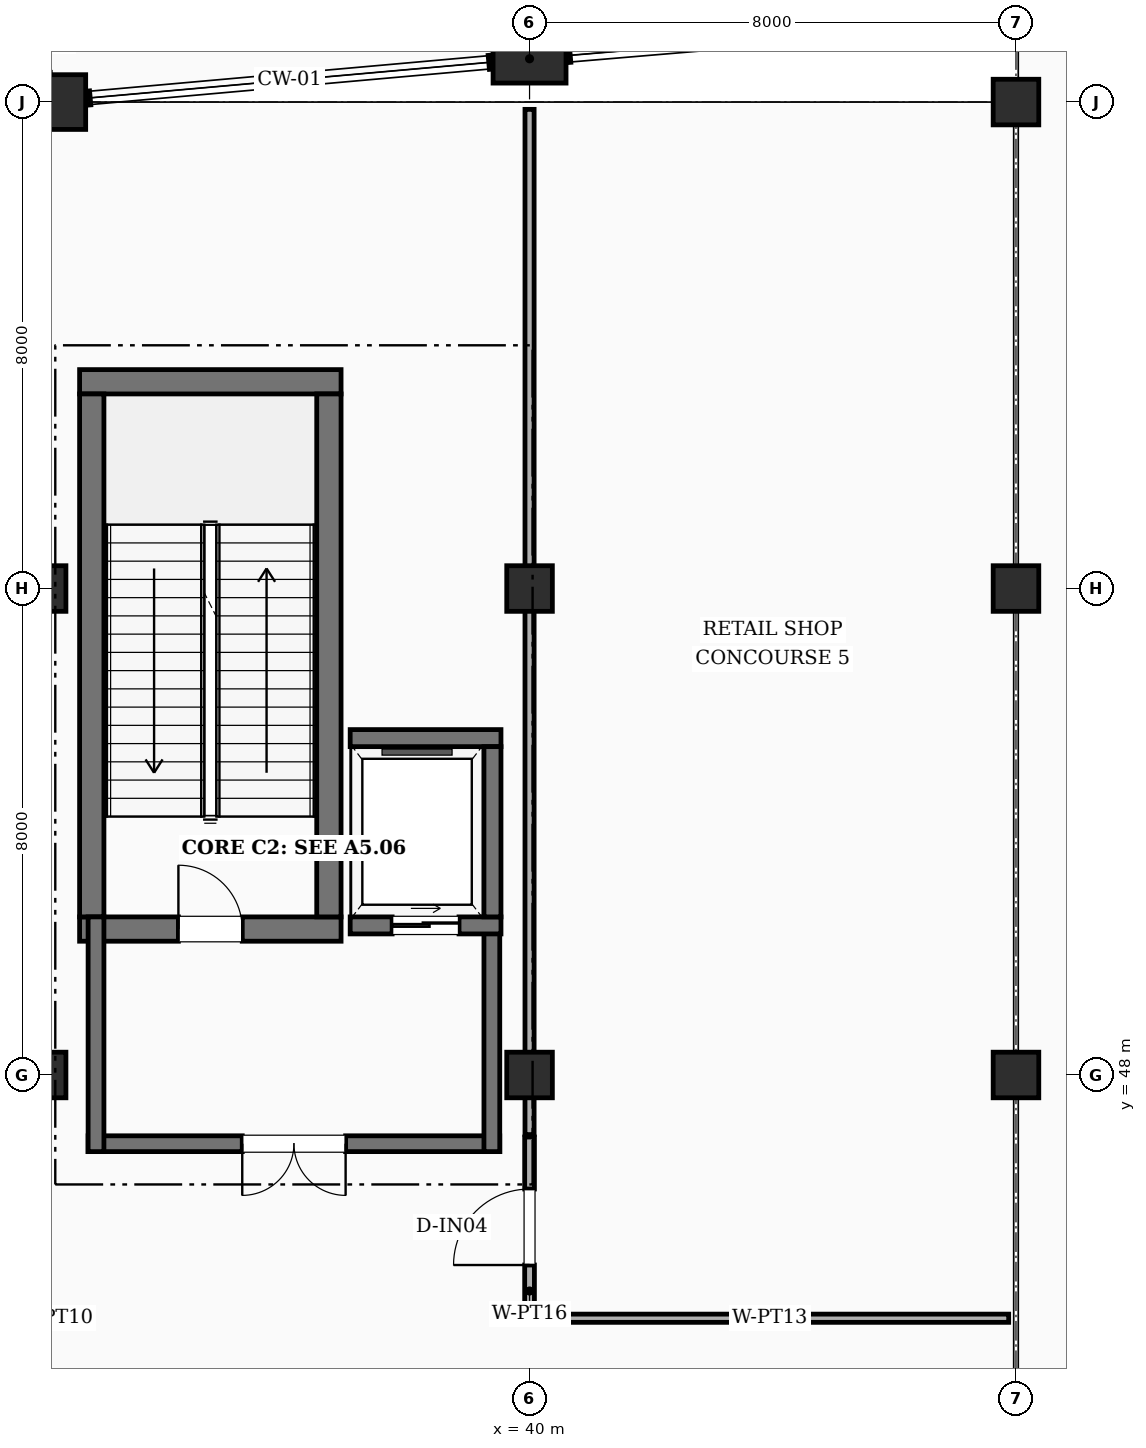
"""IFC4 building model, lengths in metres.
Left out: names, types, materials, properties, quantities, classifications, styles, units other than length and angle.
Written with IfcOpenShell. Run it as: python <this file> out.ifc"""

import sys

from ifc_helpers import new_model, si_unit, direction, frame, frame_2d, origin, origin_2d, place, context, subcontext, project, spatial, rectangle, extrude, element, fill, save


model = new_model("IFC4")
c1 = context("Model", 3, precision=1e-05, world=origin(), true_north=direction((0.0, 1.0)))
c2 = subcontext(c1, "Body", "Model", "MODEL_VIEW")
j1 = project(units=[si_unit("LENGTHUNIT", "METRE"), si_unit("PLANEANGLEUNIT", "RADIAN")], contexts=[c1])
p1 = place(None, origin())
s1 = spatial("IfcSite", under=j1, at=p1, CompositionType="ELEMENT")
p2 = place(p1, origin())
s2 = spatial("IfcBuilding", under=s1, at=p2, CompositionType="ELEMENT")
p3 = place(p2, origin())
s3 = spatial("IfcBuildingStorey", under=s2, at=p3, CompositionType="ELEMENT", Elevation=0.0)
p4 = place(p3, frame((32.0, 64.0, 0.0), z_axis=(0.0, 0.0, 1.0), x_axis=(1.0, 0.0, 0.0)))
e1 = element("IfcColumn", 1, at=p4, inside=s3, PredefinedType="COLUMN", context=c2, shape_type="SweptSolid", body=[
    extrude(rectangle(XDim=1.4, YDim=0.9, at=origin_2d()), origin(), (0.0, 0.0, 1.0), 5.4),
])
p5 = place(p3, frame((40.0, 64.712, 0.0), z_axis=(0.0, 0.0, 1.0), x_axis=(1.0, 0.0, 0.0)))
e2 = element("IfcColumn", 2, at=p5, inside=s3, PredefinedType="COLUMN", context=c2, shape_type="SweptSolid", body=[
    extrude(rectangle(XDim=1.2, YDim=0.8, at=origin_2d()), origin(), (0.0, 0.0, 1.0), 5.4),
])
for number, where, z_axis, x_axis in (
    (3, (32.0, 48.0, 0.0), (0.0, 0.0, 1.0), (1.0, 0.0, 0.0)),
    (4, (32.0, 56.0, 0.0), (0.0, 0.0, 1.0), (1.0, 0.0, 0.0)),
    (5, (40.0, 48.0, 0.0), (0.0, 0.0, 1.0), (1.0, 0.0, 0.0)),
    (6, (40.0, 56.0, 0.0), (0.0, 0.0, 1.0), (1.0, 0.0, 0.0)),
    (7, (48.0, 48.0, 0.0), (0.0, 0.0, 1.0), (1.0, 0.0, 0.0)),
    (8, (48.0, 56.0, 0.0), (0.0, 0.0, 1.0), (1.0, 0.0, 0.0)),
    (9, (48.0, 64.0, 0.0), (0.0, 0.0, 1.0), (1.0, 0.0, 0.0)),
):
    element("IfcColumn", number, at=place(p3, frame(where, z_axis=z_axis, x_axis=x_axis)), inside=s3, PredefinedType="COLUMN", context=c2, shape_type="SweptSolid", body=[
        extrude(rectangle(XDim=0.75, YDim=0.75, at=origin_2d()), origin(), (0.0, 0.0, 1.0), 5.4),
    ])
p6 = place(p3, frame((32.6, 50.4, 0.0), z_axis=(0.0, 0.0, 1.0), x_axis=(1.0, 0.0, 0.0)))
e10 = element("IfcWall", 10, at=p6, inside=s3, PredefinedType="SHEAR", context=c2, shape_type="SweptSolid", body=[
    extrude(rectangle(XDim=4.3, YDim=0.4, at=frame_2d((2.15, 0.0))), origin(), (0.0, 0.0, 1.0), 5.4),
])
p7 = place(p6, frame((1.625, 0.0, 0.0)))
e11 = element("IfcOpeningElement", 11, at=p7, cuts=e10, PredefinedType="OPENING", context=c2, shape_type="SweptSolid", body=[
    extrude(rectangle(XDim=1.05, YDim=2.15, at=frame_2d((0.525, 1.075))), frame((0.0, 0.21, 0.0), z_axis=(0.0, -1.0, 0.0), x_axis=(1.0, 0.0, 0.0)), (0.0, 0.0, 1.0), 0.42),
])
p8 = place(p3, frame((32.6, 59.4, 0.0), z_axis=(0.0, 0.0, 1.0), x_axis=(1.0, 0.0, 0.0)))
e12 = element("IfcWall", 12, at=p8, inside=s3, PredefinedType="SHEAR", context=c2, shape_type="SweptSolid", body=[
    extrude(rectangle(XDim=4.3, YDim=0.4, at=frame_2d((2.15, 0.0))), origin(), (0.0, 0.0, 1.0), 5.4),
])
for number, where, z_axis, x_axis in (
    (13, (32.8, 50.6, 0.0), (0.0, 0.0, 1.0), (0.0, 1.0, 0.0)),
    (14, (36.7, 50.6, 0.0), (0.0, 0.0, 1.0), (0.0, 1.0, 0.0)),
):
    element("IfcWall", number, at=place(p3, frame(where, z_axis=z_axis, x_axis=x_axis)), inside=s3, PredefinedType="SHEAR", context=c2, shape_type="SweptSolid", body=[
        extrude(rectangle(XDim=8.6, YDim=0.4, at=frame_2d((4.3, 0.0))), origin(), (0.0, 0.0, 1.0), 5.4),
    ])
p9 = place(p3, frame((39.51, 46.87, 0.0), z_axis=(0.0, 0.0, 1.0), x_axis=(-1.0, 0.0, 0.0)))
e15 = element("IfcWall", 15, at=p9, inside=s3, PredefinedType="SHEAR", context=c2, shape_type="SweptSolid", body=[
    extrude(rectangle(XDim=6.77, YDim=0.26, at=frame_2d((3.385, 0.0))), origin(), (0.0, 0.0, 1.0), 5.4),
])
p10 = place(p9, frame((2.535, 0.0, 0.0)))
e16 = element("IfcOpeningElement", 16, at=p10, cuts=e15, PredefinedType="OPENING", context=c2, shape_type="SweptSolid", body=[
    extrude(rectangle(XDim=1.7, YDim=2.2, at=frame_2d((0.85, 1.1))), frame((0.0, 0.14, 0.0), z_axis=(0.0, -1.0, 0.0), x_axis=(1.0, 0.0, 0.0)), (0.0, 0.0, 1.0), 0.28),
])
for number, where, z_axis, x_axis in (
    (17, (32.87, 46.74, 0.0), (0.0, 0.0, 1.0), (0.0, 1.0, 0.0)),
    (18, (39.38, 46.74, 0.0), (0.0, 0.0, 1.0), (0.0, 1.0, 0.0)),
):
    element("IfcWall", number, at=place(p3, frame(where, z_axis=z_axis, x_axis=x_axis)), inside=s3, PredefinedType="SHEAR", context=c2, shape_type="SweptSolid", body=[
        extrude(rectangle(XDim=3.86, YDim=0.26, at=frame_2d((1.93, 0.0))), origin(), (0.0, 0.0, 1.0), 5.4),
    ])
p11 = place(p3, frame((37.05, 50.46, 0.0), z_axis=(0.0, 0.0, 1.0), x_axis=(1.0, 0.0, 0.0)))
e19 = element("IfcWall", 19, at=p11, inside=s3, PredefinedType="SHEAR", context=c2, shape_type="SweptSolid", body=[
    extrude(rectangle(XDim=2.48, YDim=0.28, at=frame_2d((1.24, 0.0))), origin(), (0.0, 0.0, 1.0), 5.4),
])
p12 = place(p11, frame((0.69, 0.0, 0.0)))
e20 = element("IfcOpeningElement", 20, at=p12, cuts=e19, PredefinedType="OPENING", context=c2, shape_type="SweptSolid", body=[
    extrude(rectangle(XDim=1.1, YDim=2.15, at=frame_2d((0.55, 1.075))), frame((0.0, 0.15, 0.0), z_axis=(0.0, -1.0, 0.0), x_axis=(1.0, 0.0, 0.0)), (0.0, 0.0, 1.0), 0.3),
])
p13 = place(p3, frame((37.05, 53.54, 0.0), z_axis=(0.0, 0.0, 1.0), x_axis=(1.0, 0.0, 0.0)))
e21 = element("IfcWall", 21, at=p13, inside=s3, PredefinedType="SHEAR", context=c2, shape_type="SweptSolid", body=[
    extrude(rectangle(XDim=2.48, YDim=0.28, at=frame_2d((1.24, 0.0))), origin(), (0.0, 0.0, 1.0), 5.4),
])
p14 = place(p3, frame((39.39, 50.6, 0.0), z_axis=(0.0, 0.0, 1.0), x_axis=(0.0, 1.0, 0.0)))
e22 = element("IfcWall", 22, at=p14, inside=s3, PredefinedType="SHEAR", context=c2, shape_type="SweptSolid", body=[
    extrude(rectangle(XDim=2.8, YDim=0.28, at=frame_2d((1.4, 0.0))), origin(), (0.0, 0.0, 1.0), 5.4),
])
p15 = place(p3, frame((31.62, 44.0, 0.0), z_axis=(0.0, 0.0, 1.0), x_axis=(1.0, 0.0, 0.0)))
e23 = element("IfcWall", 23, at=p15, inside=s3, PredefinedType="PARTITIONING", context=c2, shape_type="SweptSolid", body=[
    extrude(rectangle(XDim=1.16, YDim=0.1, at=frame_2d((0.58, 0.0))), origin(), (0.0, 0.0, 1.0), 4.27),
])
p16 = place(p3, frame((40.0, 44.02, 0.0), z_axis=(0.0, 0.0, 1.0), x_axis=(0.0, 1.0, 0.0)))
e24 = element("IfcWall", 24, at=p16, inside=s3, PredefinedType="PARTITIONING", context=c2, shape_type="SweptSolid", body=[
    extrude(rectangle(XDim=2.96, YDim=0.16, at=frame_2d((1.48, 0.0))), origin(), (0.0, 0.0, 1.0), 4.27),
])
p17 = place(p16, frame((0.855, 0.0, 0.0)))
e25 = element("IfcOpeningElement", 25, at=p17, cuts=e24, PredefinedType="OPENING", context=c2, shape_type="SweptSolid", body=[
    extrude(rectangle(XDim=1.25, YDim=2.15, at=frame_2d((0.625, 1.075))), frame((0.0, 0.09, 0.0), z_axis=(0.0, -1.0, 0.0), x_axis=(1.0, 0.0, 0.0)), (0.0, 0.0, 1.0), 0.18),
])
p18 = place(p3, frame((40.0, 47.02, 0.0), z_axis=(0.0, 0.0, 1.0), x_axis=(0.0, 1.0, 0.0)))
e26 = element("IfcWall", 26, at=p18, inside=s3, PredefinedType="PARTITIONING", context=c2, shape_type="SweptSolid", body=[
    extrude(rectangle(XDim=16.86, YDim=0.15, at=frame_2d((8.43, 0.0))), origin(), (0.0, 0.0, 1.0), 4.27),
])
p19 = place(p3, frame((40.02, 44.0, 0.0), z_axis=(0.0, 0.0, 1.0), x_axis=(1.0, 0.0, 0.0)))
e27 = element("IfcWall", 27, at=p19, inside=s3, PredefinedType="PARTITIONING", context=c2, shape_type="SweptSolid", body=[
    extrude(rectangle(XDim=7.86, YDim=0.135, at=frame_2d((3.93, 0.0))), origin(), (0.0, 0.0, 1.0), 4.27),
])
p20 = place(p7, origin())
e28 = element("IfcDoor", 28, at=p20, inside=s3, OperationType="SINGLE_SWING_LEFT", PredefinedType="DOOR", context=c2, shape_type="SweptSolid", body=[
    extrude(rectangle(XDim=1.05, YDim=2.15, at=frame_2d((0.525, 1.075))), frame((0.0, 0.025, 0.0), z_axis=(0.0, -1.0, 0.0), x_axis=(1.0, 0.0, 0.0)), (0.0, 0.0, 1.0), 0.05),
])
fill(e11, e28)
p21 = place(p10, origin())
e29 = element("IfcDoor", 29, at=p21, inside=s3, OperationType="DOUBLE_DOOR_SINGLE_SWING", PredefinedType="DOOR", context=c2, shape_type="SweptSolid", body=[
    extrude(rectangle(XDim=1.7, YDim=2.2, at=frame_2d((0.85, 1.1))), frame((0.0, 0.025, 0.0), z_axis=(0.0, -1.0, 0.0), x_axis=(1.0, 0.0, 0.0)), (0.0, 0.0, 1.0), 0.05),
])
fill(e16, e29)
p22 = place(p12, origin())
e30 = element("IfcDoor", 30, at=p22, inside=s3, OperationType="SLIDING_TO_LEFT", PredefinedType="DOOR", context=c2, shape_type="SweptSolid", body=[
    extrude(rectangle(XDim=1.1, YDim=2.15, at=frame_2d((0.55, 1.075))), frame((0.0, 0.025, 0.0), z_axis=(0.0, -1.0, 0.0), x_axis=(1.0, 0.0, 0.0)), (0.0, 0.0, 1.0), 0.05),
])
fill(e20, e30)
p23 = place(p17, origin())
e31 = element("IfcDoor", 31, at=p23, inside=s3, OperationType="SINGLE_SWING_LEFT", PredefinedType="DOOR", context=c2, shape_type="SweptSolid", body=[
    extrude(rectangle(XDim=1.25, YDim=2.15, at=frame_2d((0.625, 1.075))), frame((0.0, 0.025, 0.0), z_axis=(0.0, -1.0, 0.0), x_axis=(1.0, 0.0, 0.0)), (0.0, 0.0, 1.0), 0.05),
])
fill(e25, e31)
save(model, sys.argv[1])
